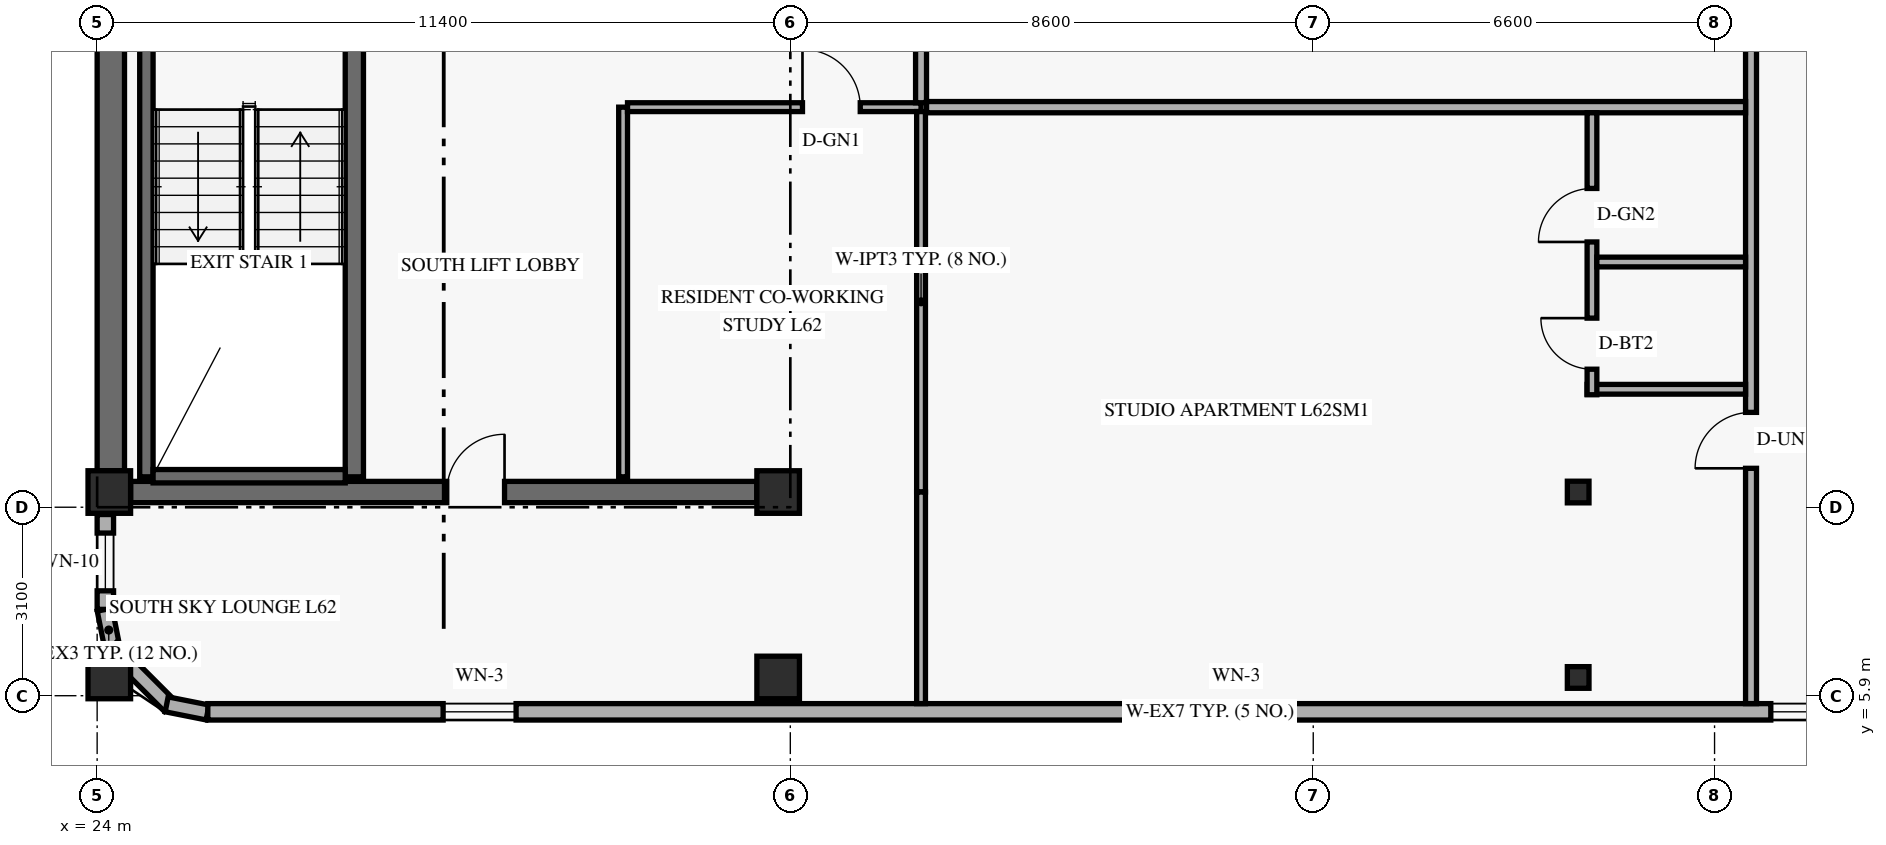
"""IFC4 building model, lengths in metres.
Left out: names, types, materials, properties, quantities, classifications, styles, units other than length and angle.
Written with IfcOpenShell. Run it as: python <this file> out.ifc"""

import sys

from ifc_helpers import new_model, si_unit, direction, frame, frame_2d, origin, origin_2d, place, context, subcontext, project, spatial, rectangle, hollow_rectangle, extrude, element, fill, save


model = new_model("IFC4")
c1 = context("Model", 3, precision=1e-05, world=origin(), true_north=direction((0.0, 1.0)))
c2 = subcontext(c1, "Body", "Model", "MODEL_VIEW")
j1 = project(units=[si_unit("LENGTHUNIT", "METRE"), si_unit("PLANEANGLEUNIT", "RADIAN")], contexts=[c1])
p1 = place(None, origin())
s1 = spatial("IfcSite", under=j1, at=p1, CompositionType="ELEMENT")
p2 = place(p1, origin())
s2 = spatial("IfcBuilding", under=s1, at=p2, CompositionType="ELEMENT")
p3 = place(p2, frame((0.0, 0.0, 238.8)))
s3 = spatial("IfcBuildingStorey", under=s2, at=p3, CompositionType="ELEMENT", Elevation=238.8)
p4 = place(p3, frame((24.225, 9.6, 0.0), z_axis=(0.0, 0.0, 1.0), x_axis=(0.0, 1.0, 0.0)))
e1 = element("IfcWall", 1, at=p4, inside=s3, PredefinedType="SHEAR", context=c2, shape_type="SweptSolid", body=[
    extrude(rectangle(XDim=7.6, YDim=0.45, at=frame_2d((3.8, 0.0))), origin(), (0.0, 0.0, 1.0), 2.821),
])
p5 = place(p3, frame((24.55, 9.25, 0.0), z_axis=(0.0, 0.0, 1.0), x_axis=(1.0, 0.0, 0.0)))
e2 = element("IfcWall", 2, at=p5, inside=s3, PredefinedType="SHEAR", context=c2, shape_type="SweptSolid", body=[
    extrude(rectangle(XDim=10.3, YDim=0.35, at=frame_2d((5.15, 0.0))), origin(), (0.0, 0.0, 1.0), 3.36),
])
p6 = place(p5, frame((5.2, 0.0, 0.0)))
e3 = element("IfcOpeningElement", 3, at=p6, cuts=e2, PredefinedType="OPENING", context=c2, shape_type="SweptSolid", body=[
    extrude(rectangle(XDim=0.95, YDim=2.15, at=frame_2d((0.475, 1.075))), frame((0.0, 0.185, 0.0), z_axis=(0.0, -1.0, 0.0), x_axis=(1.0, 0.0, 0.0)), (0.0, 0.0, 1.0), 0.37),
])
p7 = place(p3, frame((24.81, 9.5, 0.0), z_axis=(0.0, 0.0, 1.0), x_axis=(0.0, 1.0, 0.0)))
e4 = element("IfcWall", 4, at=p7, inside=s3, PredefinedType="SHEAR", context=c2, shape_type="SweptSolid", body=[
    extrude(rectangle(XDim=7.76, YDim=0.22, at=frame_2d((3.88, 0.0))), origin(), (0.0, 0.0, 1.0), 3.36),
])
p8 = place(p3, frame((28.23, 9.5, 0.0), z_axis=(0.0, 0.0, 1.0), x_axis=(0.0, 1.0, 0.0)))
e5 = element("IfcWall", 5, at=p8, inside=s3, PredefinedType="SHEAR", context=c2, shape_type="SweptSolid", body=[
    extrude(rectangle(XDim=7.76, YDim=0.3, at=frame_2d((3.88, 0.0))), origin(), (0.0, 0.0, 1.0), 3.36),
])
p9 = place(p3, frame((24.92, 9.51, 0.0), z_axis=(0.0, 0.0, 1.0), x_axis=(1.0, 0.0, 0.0)))
e6 = element("IfcWall", 6, at=p9, inside=s3, PredefinedType="SHEAR", context=c2, shape_type="SweptSolid", body=[
    extrude(rectangle(XDim=3.16, YDim=0.22, at=frame_2d((1.58, 0.0))), origin(), (0.0, 0.0, 1.0), 3.36),
])
for number, where, z_axis, x_axis in (
    (7, (24.2, 6.2, 0.0), (0.0, 0.0, 1.0), (1.0, 0.0, 0.0)),
    (8, (24.2, 9.25, 0.0), (0.0, 0.0, 1.0), (1.0, 0.0, 0.0)),
    (9, (35.2, 6.2, 0.0), (0.0, 0.0, 1.0), (1.0, 0.0, 0.0)),
    (10, (35.2, 9.25, 0.0), (0.0, 0.0, 1.0), (1.0, 0.0, 0.0)),
):
    element("IfcColumn", number, at=place(p3, frame(where, z_axis=z_axis, x_axis=x_axis)), inside=s3, PredefinedType="COLUMN", context=c2, shape_type="SweptSolid", body=[
        extrude(rectangle(XDim=0.7, YDim=0.7, at=origin_2d()), origin(), (0.0, 0.0, 1.0), 3.6),
    ])
for number, where, z_axis, x_axis in (
    (11, (48.294, 6.2, 0.0), (0.035, 0.0, 0.999), (0.0, 1.0, 0.0)),
    (12, (48.294, 9.25, 0.0), (0.035, 0.0, 0.999), (0.0, 1.0, 0.0)),
):
    element("IfcColumn", number, at=place(p3, frame(where, z_axis=z_axis, x_axis=x_axis)), inside=s3, PredefinedType="COLUMN", context=c2, shape_type="SweptSolid", body=[
        extrude(hollow_rectangle(XDim=0.356, YDim=0.356, WallThickness=0.016, at=origin_2d()), origin(), (0.0, 0.0, 1.0), 3.602),
    ])
p10 = place(p3, frame((24.124, 7.316, 0.0), z_axis=(0.0, 0.0, 1.0), x_axis=(0.194952956674, -0.980812594069, 0.0)))
e13 = element("IfcWall", 13, at=p10, inside=s3, PredefinedType="SOLIDWALL", context=c2, shape_type="SweptSolid", body=[
    extrude(rectangle(XDim=0.686, YDim=0.25, at=frame_2d((0.343, 0.0))), origin(), (0.0, 0.0, 1.0), 2.803),
])
p11 = place(p3, frame((24.231, 6.694, 0.0), z_axis=(0.0, 0.0, 1.0), x_axis=(0.707106781187, -0.707106781187, 0.0)))
e14 = element("IfcWall", 14, at=p11, inside=s3, PredefinedType="SOLIDWALL", context=c2, shape_type="SweptSolid", body=[
    extrude(rectangle(XDim=1.362, YDim=0.25, at=frame_2d((0.681, 0.0))), origin(), (0.0, 0.0, 1.0), 2.803),
])
p12 = place(p3, frame((25.143, 5.758, 0.0), z_axis=(0.0, 0.0, 1.0), x_axis=(0.980812594069, -0.194952956674, 0.0)))
e15 = element("IfcWall", 15, at=p12, inside=s3, PredefinedType="SOLIDWALL", context=c2, shape_type="SweptSolid", body=[
    extrude(rectangle(XDim=0.686, YDim=0.25, at=frame_2d((0.343, 0.0))), origin(), (0.0, 0.0, 1.0), 3.36),
])
p13 = place(p3, frame((25.82, 5.635, 0.0), z_axis=(0.0, 0.0, 1.0), x_axis=(1.0, 0.0, 0.0)))
e16 = element("IfcWall", 16, at=p13, inside=s3, PredefinedType="SOLIDWALL", context=c2, shape_type="SweptSolid", body=[
    extrude(rectangle(XDim=32.96, YDim=0.27, at=frame_2d((16.48, 0.0))), origin(), (0.0, 0.0, 1.0), 3.36),
])
p14 = place(p13, frame((3.87, 0.0, 0.85)))
e17 = element("IfcOpeningElement", 17, at=p14, cuts=e16, PredefinedType="OPENING", context=c2, shape_type="SweptSolid", body=[
    extrude(rectangle(XDim=1.2, YDim=1.5, at=frame_2d((0.6, 0.75))), frame((0.0, 0.145, 0.0), z_axis=(0.0, -1.0, 0.0), x_axis=(1.0, 0.0, 0.0)), (0.0, 0.0, 1.0), 0.29),
])
p15 = place(p13, frame((16.313, 0.0, 0.85)))
e18 = element("IfcOpeningElement", 18, at=p15, cuts=e16, PredefinedType="OPENING", context=c2, shape_type="SweptSolid", body=[
    extrude(rectangle(XDim=1.2, YDim=1.5, at=frame_2d((0.6, 0.75))), frame((0.0, 0.145, 0.0), z_axis=(0.0, -1.0, 0.0), x_axis=(1.0, 0.0, 0.0)), (0.0, 0.0, 1.0), 0.29),
])
p16 = place(p13, frame((25.705, 0.0, 0.85)))
e19 = element("IfcOpeningElement", 19, at=p16, cuts=e16, PredefinedType="OPENING", context=c2, shape_type="SweptSolid", body=[
    extrude(rectangle(XDim=1.2, YDim=1.5, at=frame_2d((0.6, 0.75))), frame((0.0, 0.145, 0.0), z_axis=(0.0, -1.0, 0.0), x_axis=(1.0, 0.0, 0.0)), (0.0, 0.0, 1.0), 0.29),
])
p17 = place(p13, frame((28.191, 0.0, 0.85)))
e20 = element("IfcOpeningElement", 20, at=p17, cuts=e16, PredefinedType="OPENING", context=c2, shape_type="SweptSolid", body=[
    extrude(rectangle(XDim=1.2, YDim=1.5, at=frame_2d((0.6, 0.75))), frame((0.0, 0.145, 0.0), z_axis=(0.0, -1.0, 0.0), x_axis=(1.0, 0.0, 0.0)), (0.0, 0.0, 1.0), 0.29),
])
p18 = place(p3, frame((24.135, 7.32, 0.0), z_axis=(0.0, 0.0, 1.0), x_axis=(0.0, 1.0, 0.0)))
e21 = element("IfcWall", 21, at=p18, inside=s3, PredefinedType="SOLIDWALL", context=c2, shape_type="SweptSolid", body=[
    extrude(rectangle(XDim=1.56, YDim=0.27, at=frame_2d((0.78, 0.0))), origin(), (0.0, 0.0, 1.0), 2.803),
])
p19 = place(p18, frame((0.305, 0.0, 0.85)))
e22 = element("IfcOpeningElement", 22, at=p19, cuts=e21, PredefinedType="OPENING", context=c2, shape_type="SweptSolid", body=[
    extrude(rectangle(XDim=0.95, YDim=1.5, at=frame_2d((0.475, 0.75))), frame((0.0, 0.145, 0.0), z_axis=(0.0, -1.0, 0.0), x_axis=(1.0, 0.0, 0.0)), (0.0, 0.0, 1.0), 0.29),
])
p20 = place(p3, frame((32.65, 9.5, 0.0), z_axis=(0.0, 0.0, 1.0), x_axis=(0.0, 1.0, 0.0)))
e23 = element("IfcWall", 23, at=p20, inside=s3, PredefinedType="PARTITIONING", context=c2, shape_type="SweptSolid", body=[
    extrude(rectangle(XDim=6.08, YDim=0.145, at=frame_2d((3.04, 0.0))), origin(), (0.0, 0.0, 1.0), 3.36),
])
p21 = place(p3, frame((32.722, 15.58, 0.0), z_axis=(0.0, 0.0, 1.0), x_axis=(1.0, 0.0, 0.0)))
e24 = element("IfcWall", 24, at=p21, inside=s3, PredefinedType="PARTITIONING", context=c2, shape_type="SweptSolid", body=[
    extrude(rectangle(XDim=4.828, YDim=0.145, at=frame_2d((2.414, 0.0))), origin(), (0.0, 0.0, 1.0), 2.803),
])
p22 = place(p21, frame((2.877, 0.0, 0.0)))
e25 = element("IfcOpeningElement", 25, at=p22, cuts=e24, PredefinedType="OPENING", context=c2, shape_type="SweptSolid", body=[
    extrude(rectangle(XDim=0.95, YDim=2.15, at=frame_2d((0.475, 1.075))), frame((0.0, 0.083, 0.0), z_axis=(0.0, -1.0, 0.0), x_axis=(1.0, 0.0, 0.0)), (0.0, 0.0, 1.0), 0.165),
])
p23 = place(p3, frame((37.55, 9.25, 0.0), z_axis=(0.0, 0.0, 1.0), x_axis=(0.0, 1.0, 0.0)))
e26 = element("IfcWall", 26, at=p23, inside=s3, PredefinedType="PARTITIONING", context=c2, shape_type="SweptSolid", body=[
    extrude(rectangle(XDim=6.258, YDim=0.145, at=frame_2d((3.129, 0.0))), origin(), (0.0, 0.0, 1.0), 2.803),
])
p24 = place(p3, frame((37.55, 15.653, 0.0), z_axis=(0.0, 0.0, 1.0), x_axis=(0.0, 1.0, 0.0)))
e27 = element("IfcWall", 27, at=p24, inside=s3, PredefinedType="STANDARD", context=c2, shape_type="SweptSolid", body=[
    extrude(rectangle(XDim=3.147, YDim=0.18, at=frame_2d((1.574, 0.0))), origin(), (0.0, 0.0, 1.0), 2.803),
])
p25 = place(p3, frame((51.2, 5.77, 0.0), z_axis=(0.0, 0.0, 1.0), x_axis=(0.0, 1.0, 0.0)))
e28 = element("IfcWall", 28, at=p25, inside=s3, PredefinedType="STANDARD", context=c2, shape_type="SweptSolid", body=[
    extrude(rectangle(XDim=13.03, YDim=0.18, at=frame_2d((6.515, 0.0))), origin(), (0.0, 0.0, 1.0), 2.803),
])
p26 = place(p25, frame((3.87, 0.0, 0.0)))
e29 = element("IfcOpeningElement", 29, at=p26, cuts=e28, PredefinedType="OPENING", context=c2, shape_type="SweptSolid", body=[
    extrude(rectangle(XDim=0.92, YDim=2.15, at=frame_2d((0.46, 1.075))), frame((0.0, 0.1, 0.0), z_axis=(0.0, -1.0, 0.0), x_axis=(1.0, 0.0, 0.0)), (0.0, 0.0, 1.0), 0.2),
])
p27 = place(p3, frame((37.55, 5.77, 0.0), z_axis=(0.0, 0.0, 1.0), x_axis=(0.0, 1.0, 0.0)))
e30 = element("IfcWall", 30, at=p27, inside=s3, PredefinedType="PARTITIONING", context=c2, shape_type="SweptSolid", body=[
    extrude(rectangle(XDim=3.48, YDim=0.145, at=frame_2d((1.74, 0.0))), origin(), (0.0, 0.0, 1.0), 2.803),
])
p28 = place(p3, frame((37.64, 15.58, 0.0), z_axis=(0.0, 0.0, 1.0), x_axis=(1.0, 0.0, 0.0)))
e31 = element("IfcWall", 31, at=p28, inside=s3, PredefinedType="PARTITIONING", context=c2, shape_type="SweptSolid", body=[
    extrude(rectangle(XDim=13.47, YDim=0.185, at=frame_2d((6.735, 0.0))), origin(), (0.0, 0.0, 1.0), 2.803),
])
p29 = place(p3, frame((48.504, 10.94, 0.0), z_axis=(0.0, 0.0, 1.0), x_axis=(1.0, 0.0, 0.0)))
e32 = element("IfcWall", 32, at=p29, inside=s3, PredefinedType="PLUMBINGWALL", context=c2, shape_type="SweptSolid", body=[
    extrude(rectangle(XDim=2.606, YDim=0.16, at=frame_2d((1.303, 0.0))), origin(), (0.0, 0.0, 1.0), 2.803),
])
p30 = place(p3, frame((48.584, 10.85, 0.0), z_axis=(0.0, 0.0, 1.0), x_axis=(0.0, 1.0, 0.0)))
e33 = element("IfcWall", 33, at=p30, inside=s3, PredefinedType="PLUMBINGWALL", context=c2, shape_type="SweptSolid", body=[
    extrude(rectangle(XDim=4.637, YDim=0.16, at=frame_2d((2.319, 0.0))), origin(), (0.0, 0.0, 1.0), 2.803),
])
p31 = place(p30, frame((0.42, 0.0, 0.0)))
e34 = element("IfcOpeningElement", 34, at=p31, cuts=e33, PredefinedType="OPENING", context=c2, shape_type="SweptSolid", body=[
    extrude(rectangle(XDim=0.84, YDim=2.12, at=frame_2d((0.42, 1.06))), frame((0.0, 0.09, 0.0), z_axis=(0.0, -1.0, 0.0), x_axis=(1.0, 0.0, 0.0)), (0.0, 0.0, 1.0), 0.18),
])
p32 = place(p30, frame((2.513, 0.0, 0.0)))
e35 = element("IfcOpeningElement", 35, at=p32, cuts=e33, PredefinedType="OPENING", context=c2, shape_type="SweptSolid", body=[
    extrude(rectangle(XDim=0.88, YDim=2.12, at=frame_2d((0.44, 1.06))), frame((0.0, 0.09, 0.0), z_axis=(0.0, -1.0, 0.0), x_axis=(1.0, 0.0, 0.0)), (0.0, 0.0, 1.0), 0.18),
])
p33 = place(p3, frame((48.664, 13.033, 0.0), z_axis=(0.0, 0.0, 1.0), x_axis=(1.0, 0.0, 0.0)))
e36 = element("IfcWall", 36, at=p33, inside=s3, PredefinedType="PLUMBINGWALL", context=c2, shape_type="SweptSolid", body=[
    extrude(rectangle(XDim=2.446, YDim=0.16, at=frame_2d((1.223, 0.0))), origin(), (0.0, 0.0, 1.0), 3.36),
])
p34 = place(p14, origin())
e37 = element("IfcWindow", 37, at=p34, inside=s3, PartitioningType="SINGLE_PANEL", PredefinedType="WINDOW", context=c2, shape_type="SweptSolid", body=[
    extrude(rectangle(XDim=1.2, YDim=1.5, at=frame_2d((0.6, 0.75))), frame((0.0, 0.03, 0.0), z_axis=(0.0, -1.0, 0.0), x_axis=(1.0, 0.0, 0.0)), (0.0, 0.0, 1.0), 0.06),
])
fill(e17, e37)
p35 = place(p15, origin())
e38 = element("IfcWindow", 38, at=p35, inside=s3, PartitioningType="SINGLE_PANEL", PredefinedType="WINDOW", context=c2, shape_type="SweptSolid", body=[
    extrude(rectangle(XDim=1.2, YDim=1.5, at=frame_2d((0.6, 0.75))), frame((0.0, 0.03, 0.0), z_axis=(0.0, -1.0, 0.0), x_axis=(1.0, 0.0, 0.0)), (0.0, 0.0, 1.0), 0.06),
])
fill(e18, e38)
p36 = place(p16, origin())
e39 = element("IfcWindow", 39, at=p36, inside=s3, PartitioningType="SINGLE_PANEL", PredefinedType="WINDOW", context=c2, shape_type="SweptSolid", body=[
    extrude(rectangle(XDim=1.2, YDim=1.5, at=frame_2d((0.6, 0.75))), frame((0.0, 0.03, 0.0), z_axis=(0.0, -1.0, 0.0), x_axis=(1.0, 0.0, 0.0)), (0.0, 0.0, 1.0), 0.06),
])
fill(e19, e39)
p37 = place(p19, origin())
e40 = element("IfcWindow", 40, at=p37, inside=s3, PartitioningType="SINGLE_PANEL", PredefinedType="WINDOW", context=c2, shape_type="SweptSolid", body=[
    extrude(rectangle(XDim=0.95, YDim=1.5, at=frame_2d((0.475, 0.75))), frame((0.0, 0.03, 0.0), z_axis=(0.0, -1.0, 0.0), x_axis=(1.0, 0.0, 0.0)), (0.0, 0.0, 1.0), 0.06),
])
fill(e22, e40)
p38 = place(p22, origin())
e41 = element("IfcDoor", 41, at=p38, inside=s3, OperationType="SINGLE_SWING_LEFT", PredefinedType="DOOR", context=c2, shape_type="SweptSolid", body=[
    extrude(rectangle(XDim=0.95, YDim=2.15, at=frame_2d((0.475, 1.075))), frame((0.0, 0.025, 0.0), z_axis=(0.0, -1.0, 0.0), x_axis=(1.0, 0.0, 0.0)), (0.0, 0.0, 1.0), 0.05),
])
fill(e25, e41)
p39 = place(p6, frame((0.95, 0.0, 0.0), z_axis=(0.0, 0.0, 1.0), x_axis=(-1.0, 0.0, 0.0)))
e42 = element("IfcDoor", 42, at=p39, inside=s3, OperationType="SINGLE_SWING_LEFT", PredefinedType="DOOR", context=c2, shape_type="SweptSolid", body=[
    extrude(rectangle(XDim=0.95, YDim=2.15, at=frame_2d((0.475, 1.075))), frame((0.0, 0.025, 0.0), z_axis=(0.0, -1.0, 0.0), x_axis=(1.0, 0.0, 0.0)), (0.0, 0.0, 1.0), 0.05),
])
fill(e3, e42)
p40 = place(p26, origin())
e43 = element("IfcDoor", 43, at=p40, inside=s3, OperationType="SINGLE_SWING_LEFT", PredefinedType="DOOR", context=c2, shape_type="SweptSolid", body=[
    extrude(rectangle(XDim=0.92, YDim=2.15, at=frame_2d((0.46, 1.075))), frame((0.0, 0.025, 0.0), z_axis=(0.0, -1.0, 0.0), x_axis=(1.0, 0.0, 0.0)), (0.0, 0.0, 1.0), 0.05),
])
fill(e29, e43)
p41 = place(p31, origin())
e44 = element("IfcDoor", 44, at=p41, inside=s3, OperationType="SINGLE_SWING_RIGHT", PredefinedType="DOOR", context=c2, shape_type="SweptSolid", body=[
    extrude(rectangle(XDim=0.84, YDim=2.12, at=frame_2d((0.42, 1.06))), frame((0.0, 0.025, 0.0), z_axis=(0.0, -1.0, 0.0), x_axis=(1.0, 0.0, 0.0)), (0.0, 0.0, 1.0), 0.05),
])
fill(e34, e44)
p42 = place(p32, origin())
e45 = element("IfcDoor", 45, at=p42, inside=s3, OperationType="SINGLE_SWING_LEFT", PredefinedType="DOOR", context=c2, shape_type="SweptSolid", body=[
    extrude(rectangle(XDim=0.88, YDim=2.12, at=frame_2d((0.44, 1.06))), frame((0.0, 0.025, 0.0), z_axis=(0.0, -1.0, 0.0), x_axis=(1.0, 0.0, 0.0)), (0.0, 0.0, 1.0), 0.05),
])
fill(e35, e45)
save(model, sys.argv[1])
